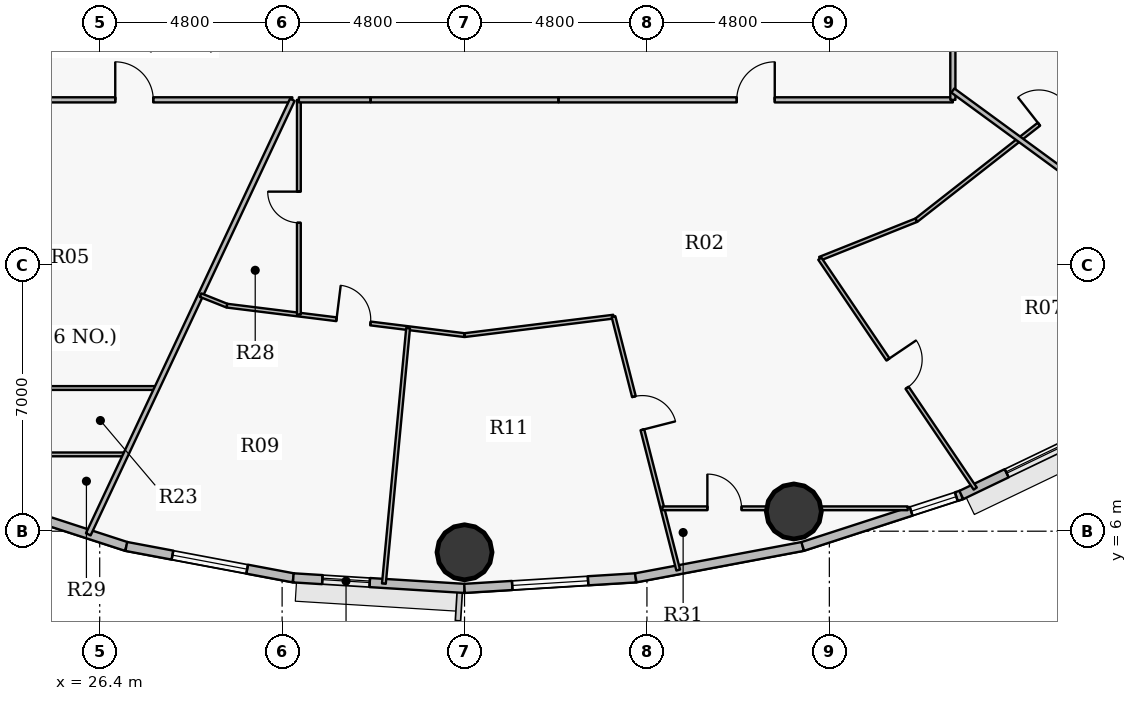
"""IFC4 building model, lengths in metres.
Left out: names, types, materials, properties, quantities, classifications, styles, units other than length and angle.
Written with IfcOpenShell. Run it as: python <this file> out.ifc"""

import sys

from ifc_helpers import new_model, si_unit, direction, frame, frame_2d, origin, origin_2d, place, context, subcontext, project, spatial, rectangle, hollow_circle, extrude, source, transform, mapped, element, fill, save


model = new_model("IFC4")
c1 = context("Model", 3, precision=1e-05, world=origin(), true_north=direction((0.0, 1.0)))
c2 = subcontext(c1, "Body", "Model", "MODEL_VIEW")
j1 = project(units=[si_unit("LENGTHUNIT", "METRE"), si_unit("PLANEANGLEUNIT", "RADIAN")], contexts=[c1])
p1 = place(None, origin())
s1 = spatial("IfcSite", under=j1, at=p1, CompositionType="ELEMENT")
p2 = place(p1, origin())
s2 = spatial("IfcBuilding", under=s1, at=p2, CompositionType="ELEMENT")
p3 = place(p2, frame((0.0, 0.0, 138.45)))
s3 = spatial("IfcBuildingStorey", under=s2, at=p3, CompositionType="ELEMENT", Elevation=138.45)
for number, where, z_axis, x_axis in (
    (1, (36.0, 5.445, 0.0), (0.0, 0.0, 1.0), (1.0, 0.0, 0.0)),
    (2, (44.666, 6.519, 0.0), (0.0, 0.0, 1.0), (1.0, 0.0, 0.0)),
):
    element("IfcColumn", number, at=place(p3, frame(where, z_axis=z_axis, x_axis=x_axis)), inside=s3, PredefinedType="COLUMN", context=c2, shape_type="SweptSolid", body=[
        extrude(hollow_circle(Radius=0.725, WallThickness=0.042, at=origin_2d()), origin(), (0.0, 0.0, 1.0), 3.75),
    ])
p4 = place(p3, frame((27.1, 5.599, 0.0), z_axis=(0.0, 0.0, 1.0), x_axis=(-0.951211346073, 0.308540070495, 0.0)))
e3 = element("IfcWall", 3, at=p4, inside=s3, PredefinedType="SOLIDWALL", context=c2, shape_type="SweptSolid", body=[
    extrude(rectangle(XDim=4.388, YDim=0.24, at=frame_2d((2.194, 0.0))), origin(), (0.0, 0.0, 1.0), 3.5),
])
p5 = place(p3, frame((31.494, 4.773, 0.0), z_axis=(0.0, 0.0, 1.0), x_axis=(-0.982789252177, 0.184730305596, 0.0)))
e4 = element("IfcWall", 4, at=p5, inside=s3, PredefinedType="SOLIDWALL", context=c2, shape_type="SweptSolid", body=[
    extrude(rectangle(XDim=4.471, YDim=0.24, at=frame_2d((2.235, 0.0))), origin(), (0.0, 0.0, 1.0), 3.5),
])
p6 = place(p5, frame((1.236, 0.0, 0.9)))
e5 = element("IfcOpeningElement", 5, at=p6, cuts=e4, PredefinedType="OPENING", context=c2, shape_type="SweptSolid", body=[
    extrude(rectangle(XDim=2.0, YDim=1.75, at=origin_2d()), frame((1.0, 0.13, 0.875), z_axis=(0.0, -1.0, 0.0), x_axis=(1.0, 0.0, 0.0)), (0.0, 0.0, 1.0), 0.26),
])
p7 = place(p3, frame((36.0, 4.495, 0.0), z_axis=(0.0, 0.0, 1.0), x_axis=(-0.998107531589, 0.061492726276, 0.0)))
e6 = element("IfcWall", 6, at=p7, inside=s3, PredefinedType="SOLIDWALL", context=c2, shape_type="SweptSolid", body=[
    extrude(rectangle(XDim=4.514, YDim=0.24, at=frame_2d((2.257, 0.0))), origin(), (0.0, 0.0, 1.0), 3.5),
])
p8 = place(p7, frame((2.499, 0.0, 0.9)))
e7 = element("IfcOpeningElement", 7, at=p8, cuts=e6, PredefinedType="OPENING", context=c2, shape_type="SweptSolid", body=[
    extrude(rectangle(XDim=1.25, YDim=1.65, at=origin_2d()), frame((0.625, 0.13, 0.825), z_axis=(0.0, -1.0, 0.0), x_axis=(1.0, 0.0, 0.0)), (0.0, 0.0, 1.0), 0.26),
])
p9 = place(p3, frame((40.506, 4.773, 0.0), z_axis=(0.0, 0.0, 1.0), x_axis=(-0.998107531589, -0.061492726276, 0.0)))
e8 = element("IfcWall", 8, at=p9, inside=s3, PredefinedType="SOLIDWALL", context=c2, shape_type="SweptSolid", body=[
    extrude(rectangle(XDim=4.514, YDim=0.24, at=frame_2d((2.257, 0.0))), origin(), (0.0, 0.0, 1.0), 3.5),
])
p10 = place(p9, frame((1.257, 0.0, 0.9)))
e9 = element("IfcOpeningElement", 9, at=p10, cuts=e8, PredefinedType="OPENING", context=c2, shape_type="SweptSolid", body=[
    extrude(rectangle(XDim=2.0, YDim=1.75, at=origin_2d()), frame((1.0, 0.13, 0.875), z_axis=(0.0, -1.0, 0.0), x_axis=(1.0, 0.0, 0.0)), (0.0, 0.0, 1.0), 0.26),
])
p11 = place(p3, frame((44.9, 5.599, 0.0), z_axis=(0.0, 0.0, 1.0), x_axis=(-0.982789252177, -0.184730305596, 0.0)))
e10 = element("IfcWall", 10, at=p11, inside=s3, PredefinedType="SOLIDWALL", context=c2, shape_type="SweptSolid", body=[
    extrude(rectangle(XDim=4.471, YDim=0.24, at=frame_2d((2.235, 0.0))), origin(), (0.0, 0.0, 1.0), 3.5),
])
p12 = place(p3, frame((49.074, 6.953, 0.0), z_axis=(0.0, 0.0, 1.0), x_axis=(-0.951211346073, -0.308540070495, 0.0)))
e11 = element("IfcWall", 11, at=p12, inside=s3, PredefinedType="SOLIDWALL", context=c2, shape_type="SweptSolid", body=[
    extrude(rectangle(XDim=4.388, YDim=0.24, at=frame_2d((2.194, 0.0))), origin(), (0.0, 0.0, 1.0), 3.5),
])
p13 = place(p12, frame((0.14, 0.0, 0.9)))
e12 = element("IfcOpeningElement", 12, at=p13, cuts=e11, PredefinedType="OPENING", context=c2, shape_type="SweptSolid", body=[
    extrude(rectangle(XDim=1.25, YDim=1.65, at=origin_2d()), frame((0.625, 0.13, 0.825), z_axis=(0.0, -1.0, 0.0), x_axis=(1.0, 0.0, 0.0)), (0.0, 0.0, 1.0), 0.26),
])
p14 = place(p3, frame((52.925, 8.801, 0.0), z_axis=(0.0, 0.0, 1.0), x_axis=(-0.901589935876, -0.432591709962, 0.0)))
e13 = element("IfcWall", 13, at=p14, inside=s3, PredefinedType="SOLIDWALL", context=c2, shape_type="SweptSolid", body=[
    extrude(rectangle(XDim=4.272, YDim=0.24, at=frame_2d((2.136, 0.0))), origin(), (0.0, 0.0, 1.0), 3.5),
])
p15 = place(p14, frame((0.949, 0.0, 0.9)))
e14 = element("IfcOpeningElement", 14, at=p15, cuts=e13, PredefinedType="OPENING", context=c2, shape_type="SweptSolid", body=[
    extrude(rectangle(XDim=2.0, YDim=1.75, at=origin_2d()), frame((1.0, 0.13, 0.875), z_axis=(0.0, -1.0, 0.0), x_axis=(1.0, 0.0, 0.0)), (0.0, 0.0, 1.0), 0.26),
])
p16 = place(p3, frame((17.62, 9.768, 0.0), z_axis=(0.0, 0.0, 1.0), x_axis=(1.0, 0.0, 0.0)))
e15 = element("IfcWall", 15, at=p16, inside=s3, PredefinedType="PARTITIONING", context=c2, shape_type="SweptSolid", body=[
    extrude(rectangle(XDim=10.288, YDim=0.1, at=frame_2d((5.144, 0.0))), origin(), (0.0, 0.0, 1.0), 2.935),
])
p17 = place(p16, frame((3.322, 0.0, 0.0)))
e16 = element("IfcOpeningElement", 16, at=p17, cuts=e15, PredefinedType="OPENING", context=c2, shape_type="SweptSolid", body=[
    extrude(rectangle(XDim=0.9, YDim=2.1, at=origin_2d()), frame((0.45, 0.06, 1.05), z_axis=(0.0, -1.0, 0.0), x_axis=(1.0, 0.0, 0.0)), (0.0, 0.0, 1.0), 0.12),
])
p18 = place(p3, frame((20.688, 8.021, 0.0), z_axis=(0.0, 0.0, 1.0), x_axis=(1.0, 0.0, 0.0)))
e17 = element("IfcWall", 17, at=p18, inside=s3, PredefinedType="PARTITIONING", context=c2, shape_type="SweptSolid", body=[
    extrude(rectangle(XDim=6.399, YDim=0.1, at=frame_2d((3.2, 0.0))), origin(), (0.0, 0.0, 1.0), 2.935),
])
p19 = place(p18, frame((3.591, 0.0, 0.0)))
e18 = element("IfcOpeningElement", 18, at=p19, cuts=e17, PredefinedType="OPENING", context=c2, shape_type="SweptSolid", body=[
    extrude(rectangle(XDim=0.82, YDim=2.1, at=origin_2d()), frame((0.41, 0.06, 1.05), z_axis=(0.0, -1.0, 0.0), x_axis=(1.0, 0.0, 0.0)), (0.0, 0.0, 1.0), 0.12),
])
p20 = place(p3, frame((23.15, 17.35, 0.0), z_axis=(0.0, 0.0, 1.0), x_axis=(1.0, 0.0, 0.0)))
e19 = element("IfcWall", 19, at=p20, inside=s3, PredefinedType="PARTITIONING", context=c2, shape_type="SweptSolid", body=[
    extrude(rectangle(XDim=8.318, YDim=0.135, at=frame_2d((4.159, 0.0))), origin(), (0.0, 0.0, 1.0), 2.935),
])
p21 = place(p20, frame((3.659, 0.0, 0.0)))
e20 = element("IfcOpeningElement", 20, at=p21, cuts=e19, PredefinedType="OPENING", context=c2, shape_type="SweptSolid", body=[
    extrude(rectangle(XDim=1.0, YDim=2.15, at=origin_2d()), frame((0.5, 0.078, 1.075), z_axis=(0.0, -1.0, 0.0), x_axis=(1.0, 0.0, 0.0)), (0.0, 0.0, 1.0), 0.155),
])
p22 = place(p3, frame((26.1, 5.918, 0.0), z_axis=(0.0, 0.0, 1.0), x_axis=(0.425072644526, 0.905159238408, 0.0)))
e21 = element("IfcWall", 21, at=p22, inside=s3, PredefinedType="PARTITIONING", context=c2, shape_type="SweptSolid", body=[
    extrude(rectangle(XDim=12.63, YDim=0.135, at=frame_2d((6.315, 0.0))), origin(), (0.0, 0.0, 1.0), 2.935),
])
p23 = place(p3, frame((29.055, 12.211, 0.0), z_axis=(0.0, 0.0, 1.0), x_axis=(0.928859514795, -0.370432182423, 0.0)))
e22 = element("IfcWall", 22, at=p23, inside=s3, PredefinedType="PARTITIONING", context=c2, shape_type="SweptSolid", body=[
    extrude(rectangle(XDim=0.747, YDim=0.1, at=frame_2d((0.374, 0.0))), origin(), (0.0, 0.0, 1.0), 3.5),
])
p24 = place(p3, frame((29.749, 11.934, 0.0), z_axis=(0.0, 0.0, 1.0), x_axis=(0.992395485088, -0.123090215599, 0.0)))
e23 = element("IfcWall", 23, at=p24, inside=s3, PredefinedType="PARTITIONING", context=c2, shape_type="SweptSolid", body=[
    extrude(rectangle(XDim=6.299, YDim=0.1, at=frame_2d((3.15, 0.0))), origin(), (0.0, 0.0, 1.0), 2.935),
])
p25 = place(p24, frame((2.905, 0.0, 0.0)))
e24 = element("IfcOpeningElement", 24, at=p25, cuts=e23, PredefinedType="OPENING", context=c2, shape_type="SweptSolid", body=[
    extrude(rectangle(XDim=0.9, YDim=2.1, at=origin_2d()), frame((0.45, 0.06, 1.05), z_axis=(0.0, -1.0, 0.0), x_axis=(1.0, 0.0, 0.0)), (0.0, 0.0, 1.0), 0.12),
])
p26 = place(p3, frame((31.641, 11.7, 0.0), z_axis=(0.0, 0.0, 1.0), x_axis=(0.0, 1.0, 0.0)))
e25 = element("IfcWall", 25, at=p26, inside=s3, PredefinedType="PARTITIONING", context=c2, shape_type="SweptSolid", body=[
    extrude(rectangle(XDim=5.65, YDim=0.1, at=frame_2d((2.825, 0.0))), origin(), (0.0, 0.0, 1.0), 3.5),
])
p27 = place(p26, frame((2.415, 0.0, 0.0)))
e26 = element("IfcOpeningElement", 26, at=p27, cuts=e25, PredefinedType="OPENING", context=c2, shape_type="SweptSolid", body=[
    extrude(rectangle(XDim=0.82, YDim=2.1, at=origin_2d()), frame((0.41, 0.06, 1.05), z_axis=(0.0, -1.0, 0.0), x_axis=(1.0, 0.0, 0.0)), (0.0, 0.0, 1.0), 0.12),
])
p28 = place(p3, frame((31.641, 17.35, 0.0), z_axis=(0.0, 0.0, 1.0), x_axis=(1.0, 0.0, 0.0)))
e27 = element("IfcWall", 27, at=p28, inside=s3, PredefinedType="PARTITIONING", context=c2, shape_type="SweptSolid", body=[
    extrude(rectangle(XDim=1.882, YDim=0.135, at=frame_2d((0.941, 0.0))), origin(), (0.0, 0.0, 1.0), 3.5),
])
p29 = place(p3, frame((33.878, 4.621, 0.0), z_axis=(0.0, 0.0, 1.0), x_axis=(0.094368865944, 0.995537300728, 0.0)))
e28 = element("IfcWall", 28, at=p29, inside=s3, PredefinedType="PARTITIONING", context=c2, shape_type="SweptSolid", body=[
    extrude(rectangle(XDim=6.752, YDim=0.1, at=frame_2d((3.376, 0.0))), origin(), (0.0, 0.0, 1.0), 2.935),
])
p30 = place(p3, frame((36.0, 11.159, 0.0), z_axis=(0.0, 0.0, 1.0), x_axis=(0.992393437711, 0.123106721131, 0.0)))
e29 = element("IfcWall", 29, at=p30, inside=s3, PredefinedType="PARTITIONING", context=c2, shape_type="SweptSolid", body=[
    extrude(rectangle(XDim=3.95, YDim=0.1, at=frame_2d((1.975, 0.0))), origin(), (0.0, 0.0, 1.0), 2.935),
])
p31 = place(p3, frame((38.477, 17.35, 0.0), z_axis=(0.0, 0.0, 1.0), x_axis=(1.0, 0.0, 0.0)))
e30 = element("IfcWall", 30, at=p31, inside=s3, PredefinedType="PARTITIONING", context=c2, shape_type="SweptSolid", body=[
    extrude(rectangle(XDim=10.373, YDim=0.135, at=frame_2d((5.187, 0.0))), origin(), (0.0, 0.0, 1.0), 2.935),
])
p32 = place(p31, frame((4.687, 0.0, 0.0)))
e31 = element("IfcOpeningElement", 31, at=p32, cuts=e30, PredefinedType="OPENING", context=c2, shape_type="SweptSolid", body=[
    extrude(rectangle(XDim=1.0, YDim=2.15, at=origin_2d()), frame((0.5, 0.078, 1.075), z_axis=(0.0, -1.0, 0.0), x_axis=(1.0, 0.0, 0.0)), (0.0, 0.0, 1.0), 0.155),
])
p33 = place(p3, frame((39.92, 11.645, 0.0), z_axis=(0.0, 0.0, 1.0), x_axis=(0.24735773306, -0.968924224021, 0.0)))
e32 = element("IfcWall", 32, at=p33, inside=s3, PredefinedType="PARTITIONING", context=c2, shape_type="SweptSolid", body=[
    extrude(rectangle(XDim=6.881, YDim=0.1, at=frame_2d((3.441, 0.0))), origin(), (0.0, 0.0, 1.0), 2.935),
])
p34 = place(p33, frame((2.172, 0.0, 0.0)))
e33 = element("IfcOpeningElement", 33, at=p34, cuts=e32, PredefinedType="OPENING", context=c2, shape_type="SweptSolid", body=[
    extrude(rectangle(XDim=0.9, YDim=2.1, at=origin_2d()), frame((0.45, 0.06, 1.05), z_axis=(0.0, -1.0, 0.0), x_axis=(1.0, 0.0, 0.0)), (0.0, 0.0, 1.0), 0.12),
])
p35 = place(p3, frame((41.208, 6.603, 0.0), z_axis=(0.0, 0.0, 1.0), x_axis=(1.0, 0.0, 0.0)))
e34 = element("IfcWall", 34, at=p35, inside=s3, PredefinedType="PARTITIONING", context=c2, shape_type="SweptSolid", body=[
    extrude(rectangle(XDim=6.453, YDim=0.1, at=frame_2d((3.227, 0.0))), origin(), (0.0, 0.0, 1.0), 2.935),
])
p36 = place(p35, frame((1.183, 0.0, 0.0)))
e35 = element("IfcOpeningElement", 35, at=p36, cuts=e34, PredefinedType="OPENING", context=c2, shape_type="SweptSolid", body=[
    extrude(rectangle(XDim=0.9, YDim=2.1, at=origin_2d()), frame((0.45, 0.06, 1.05), z_axis=(0.0, -1.0, 0.0), x_axis=(1.0, 0.0, 0.0)), (0.0, 0.0, 1.0), 0.12),
])
p37 = place(p3, frame((45.35, 13.17, 0.0), z_axis=(0.0, 0.0, 1.0), x_axis=(0.928802486491, 0.370575149044, 0.0)))
e36 = element("IfcWall", 36, at=p37, inside=s3, PredefinedType="PARTITIONING", context=c2, shape_type="SweptSolid", body=[
    extrude(rectangle(XDim=2.736, YDim=0.1, at=frame_2d((1.368, 0.0))), origin(), (0.0, 0.0, 1.0), 3.5),
])
p38 = place(p3, frame((45.35, 13.17, 0.0), z_axis=(0.0, 0.0, 1.0), x_axis=(0.560082631059, -0.828436748573, 0.0)))
e37 = element("IfcWall", 37, at=p38, inside=s3, PredefinedType="PARTITIONING", context=c2, shape_type="SweptSolid", body=[
    extrude(rectangle(XDim=7.301, YDim=0.1, at=frame_2d((3.65, 0.0))), origin(), (0.0, 0.0, 1.0), 2.935),
])
p39 = place(p38, frame((3.2, 0.0, 0.0)))
e38 = element("IfcOpeningElement", 38, at=p39, cuts=e37, PredefinedType="OPENING", context=c2, shape_type="SweptSolid", body=[
    extrude(rectangle(XDim=0.9, YDim=2.1, at=origin_2d()), frame((0.45, 0.06, 1.05), z_axis=(0.0, -1.0, 0.0), x_axis=(1.0, 0.0, 0.0)), (0.0, 0.0, 1.0), 0.12),
])
p40 = place(p3, frame((47.891, 14.184, 0.0), z_axis=(0.0, 0.0, 1.0), x_axis=(0.787333679705, 0.616527109544, 0.0)))
e39 = element("IfcWall", 39, at=p40, inside=s3, PredefinedType="PARTITIONING", context=c2, shape_type="SweptSolid", body=[
    extrude(rectangle(XDim=5.685, YDim=0.1, at=frame_2d((2.842, 0.0))), origin(), (0.0, 0.0, 1.0), 2.935),
])
p41 = place(p40, frame((4.096, 0.0, 0.0)))
e40 = element("IfcOpeningElement", 40, at=p41, cuts=e39, PredefinedType="OPENING", context=c2, shape_type="SweptSolid", body=[
    extrude(rectangle(XDim=0.9, YDim=2.1, at=origin_2d()), frame((0.45, 0.06, 1.05), z_axis=(0.0, -1.0, 0.0), x_axis=(1.0, 0.0, 0.0)), (0.0, 0.0, 1.0), 0.12),
])
p42 = place(p3, frame((48.85, 17.35, 0.0), z_axis=(0.0, 0.0, 1.0), x_axis=(0.0, 1.0, 0.0)))
e41 = element("IfcWall", 41, at=p42, inside=s3, PredefinedType="PARTITIONING", context=c2, shape_type="SweptSolid", body=[
    extrude(rectangle(XDim=19.3, YDim=0.135, at=frame_2d((9.65, 0.0))), origin(), (0.0, 0.0, 1.0), 2.935),
])
p43 = place(p42, frame((7.609, 0.0, 0.0)))
e42 = element("IfcOpeningElement", 42, at=p43, cuts=e41, PredefinedType="OPENING", context=c2, shape_type="SweptSolid", body=[
    extrude(rectangle(XDim=1.0, YDim=2.15, at=origin_2d()), frame((0.5, 0.078, 1.075), z_axis=(0.0, -1.0, 0.0), x_axis=(1.0, 0.0, 0.0)), (0.0, 0.0, 1.0), 0.155),
])
p44 = place(p3, frame((48.85, 17.595, 0.0), z_axis=(0.0, 0.0, 1.0), x_axis=(0.806958414, -0.590608261096, 0.0)))
e43 = element("IfcWall", 43, at=p44, inside=s3, PredefinedType="PARTITIONING", context=c2, shape_type="SweptSolid", body=[
    extrude(rectangle(XDim=10.063, YDim=0.135, at=frame_2d((5.032, 0.0))), origin(), (0.0, 0.0, 1.0), 2.935),
])
p45 = place(p3, frame((38.467, 17.35, 0.0), z_axis=(0.0, 0.0, 1.0), x_axis=(-1.0, 0.0, 0.0)))
e44 = element("IfcWall", 44, at=p45, inside=s3, PredefinedType="PARTITIONING", context=c2, shape_type="SweptSolid", body=[
    extrude(rectangle(XDim=4.934, YDim=0.135, at=frame_2d((2.467, 0.0))), origin(), (0.0, 0.0, 1.0), 2.935),
])
m1 = source(origin(), c2, "Body", "SweptSolid", [
    extrude(rectangle(XDim=2.0, YDim=1.75, at=origin_2d()), frame((1.0, 0.03, 0.875), z_axis=(0.0, -1.0, 0.0), x_axis=(1.0, 0.0, 0.0)), (0.0, 0.0, 1.0), 0.06),
])
p46 = place(p6, origin())
e45 = element("IfcWindow", 45, at=p46, inside=s3, PartitioningType="DOUBLE_PANEL_VERTICAL", PredefinedType="WINDOW", context=c2, shape_type="MappedRepresentation", body=[
    mapped(m1, transform((0.0, 0.0, 0.0), x_axis=(1.0, 0.0, 0.0), y_axis=(0.0, 1.0, 0.0), z_axis=(0.0, 0.0, 1.0), scale=1.0)),
])
fill(e5, e45)
m2 = source(origin(), c2, "Body", "SweptSolid", [
    extrude(rectangle(XDim=1.25, YDim=1.65, at=origin_2d()), frame((0.625, 0.03, 0.825), z_axis=(0.0, -1.0, 0.0), x_axis=(1.0, 0.0, 0.0)), (0.0, 0.0, 1.0), 0.06),
])
p47 = place(p8, origin())
e46 = element("IfcWindow", 46, at=p47, inside=s3, PartitioningType="SINGLE_PANEL", PredefinedType="WINDOW", context=c2, shape_type="MappedRepresentation", body=[
    mapped(m2, transform((0.0, 0.0, 0.0), x_axis=(1.0, 0.0, 0.0), y_axis=(0.0, 1.0, 0.0), z_axis=(0.0, 0.0, 1.0), scale=1.0)),
])
fill(e7, e46)
p48 = place(p10, origin())
e47 = element("IfcWindow", 47, at=p48, inside=s3, PartitioningType="DOUBLE_PANEL_VERTICAL", PredefinedType="WINDOW", context=c2, shape_type="MappedRepresentation", body=[
    mapped(m1, transform((0.0, 0.0, 0.0), x_axis=(1.0, 0.0, 0.0), y_axis=(0.0, 1.0, 0.0), z_axis=(0.0, 0.0, 1.0), scale=1.0)),
])
fill(e9, e47)
p49 = place(p15, origin())
e48 = element("IfcWindow", 48, at=p49, inside=s3, PartitioningType="DOUBLE_PANEL_VERTICAL", PredefinedType="WINDOW", context=c2, shape_type="MappedRepresentation", body=[
    mapped(m1, transform((0.0, 0.0, 0.0), x_axis=(1.0, 0.0, 0.0), y_axis=(0.0, 1.0, 0.0), z_axis=(0.0, 0.0, 1.0), scale=1.0)),
])
fill(e14, e48)
p50 = place(p13, origin())
e49 = element("IfcWindow", 49, at=p50, inside=s3, PartitioningType="SINGLE_PANEL", PredefinedType="WINDOW", context=c2, shape_type="MappedRepresentation", body=[
    mapped(m2, transform((0.0, 0.0, 0.0), x_axis=(1.0, 0.0, 0.0), y_axis=(0.0, 1.0, 0.0), z_axis=(0.0, 0.0, 1.0), scale=1.0)),
])
fill(e12, e49)
m3 = source(origin(), c2, "Body", "SweptSolid", [
    extrude(rectangle(XDim=1.0, YDim=2.15, at=origin_2d()), frame((0.5, 0.025, 1.075), z_axis=(0.0, -1.0, 0.0), x_axis=(1.0, 0.0, 0.0)), (0.0, 0.0, 1.0), 0.05),
])
p51 = place(p21, origin())
e50 = element("IfcDoor", 50, at=p51, inside=s3, OperationType="SINGLE_SWING_LEFT", PredefinedType="DOOR", context=c2, shape_type="MappedRepresentation", body=[
    mapped(m3, transform((0.0, 0.0, 0.0), x_axis=(1.0, 0.0, 0.0), y_axis=(0.0, 1.0, 0.0), z_axis=(0.0, 0.0, 1.0), scale=1.0)),
])
fill(e20, e50)
p52 = place(p32, origin())
e51 = element("IfcDoor", 51, at=p52, inside=s3, OperationType="SINGLE_SWING_RIGHT", PredefinedType="DOOR", context=c2, shape_type="MappedRepresentation", body=[
    mapped(m3, transform((0.0, 0.0, 0.0), x_axis=(1.0, 0.0, 0.0), y_axis=(0.0, 1.0, 0.0), z_axis=(0.0, 0.0, 1.0), scale=1.0)),
])
fill(e31, e51)
m4 = source(origin(), c2, "Body", "SweptSolid", [
    extrude(rectangle(XDim=0.9, YDim=2.1, at=origin_2d()), frame((0.45, 0.025, 1.05), z_axis=(0.0, -1.0, 0.0), x_axis=(1.0, 0.0, 0.0)), (0.0, 0.0, 1.0), 0.05),
])
p53 = place(p25, origin())
e52 = element("IfcDoor", 52, at=p53, inside=s3, OperationType="SINGLE_SWING_LEFT", PredefinedType="DOOR", context=c2, shape_type="MappedRepresentation", body=[
    mapped(m4, transform((0.0, 0.0, 0.0), x_axis=(1.0, 0.0, 0.0), y_axis=(0.0, 1.0, 0.0), z_axis=(0.0, 0.0, 1.0), scale=1.0)),
])
fill(e24, e52)
p54 = place(p34, origin())
e53 = element("IfcDoor", 53, at=p54, inside=s3, OperationType="SINGLE_SWING_RIGHT", PredefinedType="DOOR", context=c2, shape_type="MappedRepresentation", body=[
    mapped(m4, transform((0.0, 0.0, 0.0), x_axis=(1.0, 0.0, 0.0), y_axis=(0.0, 1.0, 0.0), z_axis=(0.0, 0.0, 1.0), scale=1.0)),
])
fill(e33, e53)
p55 = place(p39, origin())
e54 = element("IfcDoor", 54, at=p55, inside=s3, OperationType="SINGLE_SWING_LEFT", PredefinedType="DOOR", context=c2, shape_type="MappedRepresentation", body=[
    mapped(m4, transform((0.0, 0.0, 0.0), x_axis=(1.0, 0.0, 0.0), y_axis=(0.0, 1.0, 0.0), z_axis=(0.0, 0.0, 1.0), scale=1.0)),
])
fill(e38, e54)
m5 = source(origin(), c2, "Body", "SweptSolid", [
    extrude(rectangle(XDim=0.82, YDim=2.1, at=origin_2d()), frame((0.41, 0.025, 1.05), z_axis=(0.0, -1.0, 0.0), x_axis=(1.0, 0.0, 0.0)), (0.0, 0.0, 1.0), 0.05),
])
p56 = place(p27, origin())
e55 = element("IfcDoor", 55, at=p56, inside=s3, OperationType="SINGLE_SWING_RIGHT", PredefinedType="DOOR", context=c2, shape_type="MappedRepresentation", body=[
    mapped(m5, transform((0.0, 0.0, 0.0), x_axis=(1.0, 0.0, 0.0), y_axis=(0.0, 1.0, 0.0), z_axis=(0.0, 0.0, 1.0), scale=1.0)),
])
fill(e26, e55)
p57 = place(p36, origin())
e56 = element("IfcDoor", 56, at=p57, inside=s3, OperationType="SINGLE_SWING_LEFT", PredefinedType="DOOR", context=c2, shape_type="MappedRepresentation", body=[
    mapped(m4, transform((0.0, 0.0, 0.0), x_axis=(1.0, 0.0, 0.0), y_axis=(0.0, 1.0, 0.0), z_axis=(0.0, 0.0, 1.0), scale=1.0)),
])
fill(e35, e56)
p58 = place(p41, origin())
e57 = element("IfcDoor", 57, at=p58, inside=s3, OperationType="SINGLE_SWING_LEFT", PredefinedType="DOOR", context=c2, shape_type="MappedRepresentation", body=[
    mapped(m4, transform((0.0, 0.0, 0.0), x_axis=(1.0, 0.0, 0.0), y_axis=(0.0, 1.0, 0.0), z_axis=(0.0, 0.0, 1.0), scale=1.0)),
])
fill(e40, e57)
save(model, sys.argv[1])
